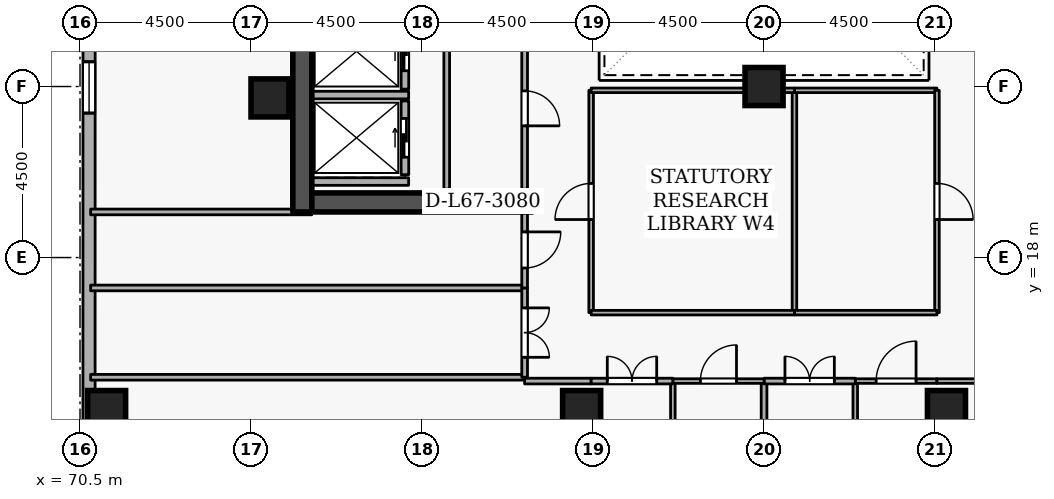
"""IFC4 building model, lengths in metres.
Left out: names, types, materials, properties, quantities, classifications, styles, units other than length and angle.
Written with IfcOpenShell. Run it as: python <this file> out.ifc"""

import sys

from ifc_helpers import new_model, si_unit, direction, frame, frame_2d, origin, origin_2d, place, context, subcontext, project, spatial, rectangle, extrude, element, fill, save


model = new_model("IFC4")
c1 = context("Model", 3, precision=1e-05, world=origin(), true_north=direction((0.0, 1.0)))
c2 = subcontext(c1, "Body", "Model", "MODEL_VIEW")
j1 = project(units=[si_unit("LENGTHUNIT", "METRE"), si_unit("PLANEANGLEUNIT", "RADIAN")], contexts=[c1])
p1 = place(None, origin())
s1 = spatial("IfcSite", under=j1, at=p1, CompositionType="ELEMENT")
p2 = place(p1, origin())
s2 = spatial("IfcBuilding", under=s1, at=p2, CompositionType="ELEMENT")
p3 = place(p2, frame((0.0, 0.0, 251.1)))
s3 = spatial("IfcBuildingStorey", under=s2, at=p3, CompositionType="ELEMENT", Elevation=251.1)
p4 = place(p3, frame((76.35, 19.2, 0.0), z_axis=(0.0, 0.0, 1.0), x_axis=(0.0, 1.0, 0.0)))
e1 = element("IfcWall", 1, at=p4, inside=s3, PredefinedType="SHEAR", context=c2, shape_type="SweptSolid", body=[
    extrude(rectangle(XDim=15.6, YDim=0.5, at=frame_2d((7.8, 0.0))), origin(), (0.0, 0.0, 1.0), 3.6),
])
p5 = place(p3, frame((76.6, 19.45, 0.0), z_axis=(0.0, 0.0, 1.0), x_axis=(1.0, 0.0, 0.0)))
e2 = element("IfcWall", 2, at=p5, inside=s3, PredefinedType="SHEAR", context=c2, shape_type="SweptSolid", body=[
    extrude(rectangle(XDim=5.8, YDim=0.5, at=frame_2d((2.9, 0.0))), origin(), (0.0, 0.0, 1.0), 3.6),
])
for number, where, z_axis, x_axis in (
    (3, (71.2, 14.0, 0.0), (0.0, 0.0, 1.0), (1.0, 0.0, 0.0)),
    (4, (93.3, 14.0, 0.0), (0.0, 0.0, 1.0), (1.0, 0.0, 0.0)),
    (5, (83.7, 14.0, 0.0), (0.0, 0.0, 1.0), (1.0, 0.0, 0.0)),
    (6, (75.5, 22.2, 0.0), (0.0, 0.0, 1.0), (1.0, 0.0, 0.0)),
    (7, (88.5, 22.5, 0.0), (0.0, 0.0, 1.0), (1.0, 0.0, 0.0)),
):
    element("IfcColumn", number, at=place(p3, frame(where, z_axis=z_axis, x_axis=x_axis)), inside=s3, PredefinedType="COLUMN", context=c2, shape_type="SweptSolid", body=[
        extrude(rectangle(XDim=1.0, YDim=1.0, at=origin_2d()), origin(), (0.0, 0.0, 1.0), 3.6),
    ])
p6 = place(p3, frame((70.742, 40.251, 0.0), z_axis=(0.0, 0.0, 1.0), x_axis=(-0.000184351399, -0.999999983007, 0.0)))
e8 = element("IfcWall", 8, at=p6, inside=s3, PredefinedType="STANDARD", context=c2, shape_type="SweptSolid", body=[
    extrude(rectangle(XDim=34.432, YDim=0.32, at=frame_2d((17.216, 0.0))), origin(), (0.0, 0.0, 1.0), 2.22),
])
p7 = place(p6, frame((7.5, 0.0, 0.72)))
e9 = element("IfcOpeningElement", 9, at=p7, cuts=e8, PredefinedType="OPENING", context=c2, shape_type="SweptSolid", body=[
    extrude(rectangle(XDim=1.35, YDim=1.05, at=frame_2d((0.675, 0.525))), frame((0.0, 0.17, 0.0), z_axis=(0.0, -1.0, 0.0), x_axis=(1.0, 0.0, 0.0)), (0.0, 0.0, 1.0), 0.34),
])
p8 = place(p6, frame((17.1, 0.0, 0.72)))
e10 = element("IfcOpeningElement", 10, at=p8, cuts=e8, PredefinedType="OPENING", context=c2, shape_type="SweptSolid", body=[
    extrude(rectangle(XDim=1.35, YDim=1.05, at=frame_2d((0.675, 0.525))), frame((0.0, 0.17, 0.0), z_axis=(0.0, -1.0, 0.0), x_axis=(1.0, 0.0, 0.0)), (0.0, 0.0, 1.0), 0.34),
])
p9 = place(p3, frame((79.05, 22.43, 0.0), z_axis=(0.0, 0.0, 1.0), x_axis=(0.0, 1.0, 0.0)))
e11 = element("IfcWall", 11, at=p9, inside=s3, PredefinedType="STANDARD", context=c2, shape_type="SweptSolid", body=[
    extrude(rectangle(XDim=1.99, YDim=0.2, at=frame_2d((0.995, 0.0))), origin(), (0.0, 0.0, 1.0), 3.32),
])
p10 = place(p9, frame((0.485, 0.0, 0.0)))
e12 = element("IfcOpeningElement", 12, at=p10, cuts=e11, PredefinedType="OPENING", context=c2, shape_type="SweptSolid", body=[
    extrude(rectangle(XDim=1.02, YDim=2.06, at=frame_2d((0.51, 1.03))), frame((0.0, 0.11, 0.0), z_axis=(0.0, -1.0, 0.0), x_axis=(1.0, 0.0, 0.0)), (0.0, 0.0, 1.0), 0.22),
])
p11 = place(p3, frame((79.05, 20.18, 0.0), z_axis=(0.0, 0.0, 1.0), x_axis=(0.0, 1.0, 0.0)))
e13 = element("IfcWall", 13, at=p11, inside=s3, PredefinedType="STANDARD", context=c2, shape_type="SweptSolid", body=[
    extrude(rectangle(XDim=1.94, YDim=0.2, at=frame_2d((0.97, 0.0))), origin(), (0.0, 0.0, 1.0), 3.32),
])
p12 = place(p11, frame((0.46, 0.0, 0.0)))
e14 = element("IfcOpeningElement", 14, at=p12, cuts=e13, PredefinedType="OPENING", context=c2, shape_type="SweptSolid", body=[
    extrude(rectangle(XDim=1.02, YDim=2.06, at=frame_2d((0.51, 1.03))), frame((0.0, 0.11, 0.0), z_axis=(0.0, -1.0, 0.0), x_axis=(1.0, 0.0, 0.0)), (0.0, 0.0, 1.0), 0.22),
])
for number, where, z_axis, x_axis in (
    (15, (76.612, 22.275, 0.0), (0.0, 0.0, 1.0), (1.0, 0.0, 0.0)),
    (16, (76.612, 20.0, 0.0), (0.0, 0.0, 1.0), (1.0, 0.0, 0.0)),
):
    element("IfcWall", number, at=place(p3, frame(where, z_axis=z_axis, x_axis=x_axis)), inside=s3, PredefinedType="STANDARD", context=c2, shape_type="SweptSolid", body=[
        extrude(rectangle(XDim=2.536, YDim=0.2, at=frame_2d((1.268, 0.0))), origin(), (0.0, 0.0, 1.0), 3.32),
    ])
p13 = place(p3, frame((80.15, 19.8, 0.0), z_axis=(0.0, 0.0, 1.0), x_axis=(0.0, 1.0, 0.0)))
e17 = element("IfcWall", 17, at=p13, inside=s3, PredefinedType="PARTITIONING", context=c2, shape_type="SweptSolid", body=[
    extrude(rectangle(XDim=4.25, YDim=0.15, at=frame_2d((2.125, 0.0))), origin(), (0.0, 0.0, 1.0), 3.32),
])
p14 = place(p3, frame((82.2, 24.05, 0.0), z_axis=(0.0, 0.0, 1.0), x_axis=(0.0, -1.0, 0.0)))
e18 = element("IfcWall", 18, at=p14, inside=s3, PredefinedType="PARTITIONING", context=c2, shape_type="SweptSolid", body=[
    extrude(rectangle(XDim=4.25, YDim=0.15, at=frame_2d((2.125, 0.0))), origin(), (0.0, 0.0, 1.0), 3.32),
])
p15 = place(p14, frame((1.665, 0.0, 0.0)))
e19 = element("IfcOpeningElement", 19, at=p15, cuts=e18, PredefinedType="OPENING", context=c2, shape_type="SweptSolid", body=[
    extrude(rectangle(XDim=0.92, YDim=2.08, at=frame_2d((0.46, 1.04))), frame((0.0, 0.085, 0.0), z_axis=(0.0, -1.0, 0.0), x_axis=(1.0, 0.0, 0.0)), (0.0, 0.0, 1.0), 0.17),
])
for number, where, z_axis, x_axis in (
    (20, (82.2, 14.85, 0.0), (0.0, 0.0, 1.0), (-1.0, 0.0, 0.0)),
    (21, (70.78, 17.2, 0.0), (0.0, 0.0, 1.0), (1.0, 0.0, 0.0)),
):
    element("IfcWall", number, at=place(p3, frame(where, z_axis=z_axis, x_axis=x_axis)), inside=s3, PredefinedType="PARTITIONING", context=c2, shape_type="SweptSolid", body=[
        extrude(rectangle(XDim=11.42, YDim=0.15, at=frame_2d((5.71, 0.0))), origin(), (0.0, 0.0, 1.0), 3.32),
    ])
p16 = place(p3, frame((82.2, 17.2, 0.0), z_axis=(0.0, 0.0, 1.0), x_axis=(0.0, -1.0, 0.0)))
e22 = element("IfcWall", 22, at=p16, inside=s3, PredefinedType="PARTITIONING", context=c2, shape_type="SweptSolid", body=[
    extrude(rectangle(XDim=2.35, YDim=0.15, at=frame_2d((1.175, 0.0))), origin(), (0.0, 0.0, 1.0), 3.32),
])
p17 = place(p16, frame((0.525, 0.0, 0.0)))
e23 = element("IfcOpeningElement", 23, at=p17, cuts=e22, PredefinedType="OPENING", context=c2, shape_type="SweptSolid", body=[
    extrude(rectangle(XDim=1.3, YDim=2.12, at=frame_2d((0.65, 1.06))), frame((0.0, 0.085, 0.0), z_axis=(0.0, -1.0, 0.0), x_axis=(1.0, 0.0, 0.0)), (0.0, 0.0, 1.0), 0.17),
])
p18 = place(p3, frame((70.78, 19.2, 0.0), z_axis=(0.0, 0.0, 1.0), x_axis=(1.0, 0.0, 0.0)))
e24 = element("IfcWall", 24, at=p18, inside=s3, PredefinedType="PARTITIONING", context=c2, shape_type="SweptSolid", body=[
    extrude(rectangle(XDim=5.82, YDim=0.15, at=frame_2d((2.91, 0.0))), origin(), (0.0, 0.0, 1.0), 2.525),
])
p19 = place(p3, frame((82.2, 19.2, 0.0), z_axis=(0.0, 0.0, 1.0), x_axis=(0.0, -1.0, 0.0)))
e25 = element("IfcWall", 25, at=p19, inside=s3, PredefinedType="PARTITIONING", context=c2, shape_type="SweptSolid", body=[
    extrude(rectangle(XDim=2.0, YDim=0.15, at=frame_2d((1.0, 0.0))), origin(), (0.0, 0.0, 1.0), 3.32),
])
p20 = place(p19, frame((0.525, 0.0, 0.0)))
e26 = element("IfcOpeningElement", 26, at=p20, cuts=e25, PredefinedType="OPENING", context=c2, shape_type="SweptSolid", body=[
    extrude(rectangle(XDim=0.95, YDim=2.1, at=frame_2d((0.475, 1.05))), frame((0.0, 0.085, 0.0), z_axis=(0.0, -1.0, 0.0), x_axis=(1.0, 0.0, 0.0)), (0.0, 0.0, 1.0), 0.17),
])
p21 = place(p3, frame((90.9, 3.28, 0.0), z_axis=(0.0, 0.0, 1.0), x_axis=(0.0, 1.0, 0.0)))
e27 = element("IfcWall", 27, at=p21, inside=s3, PredefinedType="PARTITIONING", context=c2, shape_type="SweptSolid", body=[
    extrude(rectangle(XDim=11.47, YDim=0.12, at=frame_2d((5.735, 0.0))), origin(), (0.0, 0.0, 1.0), 3.32),
])
p22 = place(p3, frame((90.9, 14.75, 0.0), z_axis=(0.0, 0.0, 1.0), x_axis=(1.0, 0.0, 0.0)))
e28 = element("IfcWall", 28, at=p22, inside=s3, PredefinedType="PARTITIONING", context=c2, shape_type="SweptSolid", body=[
    extrude(rectangle(XDim=2.15, YDim=0.12, at=frame_2d((1.075, 0.0))), origin(), (0.0, 0.0, 1.0), 3.32),
])
p23 = place(p22, frame((0.55, 0.0, 0.0)))
e29 = element("IfcOpeningElement", 29, at=p23, cuts=e28, PredefinedType="OPENING", context=c2, shape_type="SweptSolid", body=[
    extrude(rectangle(XDim=1.05, YDim=2.1, at=frame_2d((0.525, 1.05))), frame((0.0, 0.07, 0.0), z_axis=(0.0, -1.0, 0.0), x_axis=(1.0, 0.0, 0.0)), (0.0, 0.0, 1.0), 0.14),
])
p24 = place(p3, frame((93.05, 14.75, 0.0), z_axis=(0.0, 0.0, 1.0), x_axis=(1.0, 0.0, 0.0)))
e30 = element("IfcWall", 30, at=p24, inside=s3, PredefinedType="PARTITIONING", context=c2, shape_type="SweptSolid", body=[
    extrude(rectangle(XDim=1.75, YDim=0.12, at=frame_2d((0.875, 0.0))), origin(), (0.0, 0.0, 1.0), 3.32),
])
p25 = place(p3, frame((88.5, 3.28, 0.0), z_axis=(0.0, 0.0, 1.0), x_axis=(0.0, 1.0, 0.0)))
e31 = element("IfcWall", 31, at=p25, inside=s3, PredefinedType="PARTITIONING", context=c2, shape_type="SweptSolid", body=[
    extrude(rectangle(XDim=11.47, YDim=0.15, at=frame_2d((5.735, 0.0))), origin(), (0.0, 0.0, 1.0), 2.862),
])
p26 = place(p3, frame((88.5, 14.75, 0.0), z_axis=(0.0, 0.0, 1.0), x_axis=(1.0, 0.0, 0.0)))
e32 = element("IfcWall", 32, at=p26, inside=s3, PredefinedType="PARTITIONING", context=c2, shape_type="SweptSolid", body=[
    extrude(rectangle(XDim=2.4, YDim=0.15, at=frame_2d((1.2, 0.0))), origin(), (0.0, 0.0, 1.0), 3.32),
])
p27 = place(p26, frame((0.55, 0.0, 0.0)))
e33 = element("IfcOpeningElement", 33, at=p27, cuts=e32, PredefinedType="OPENING", context=c2, shape_type="SweptSolid", body=[
    extrude(rectangle(XDim=1.3, YDim=2.12, at=frame_2d((0.65, 1.06))), frame((0.0, 0.085, 0.0), z_axis=(0.0, -1.0, 0.0), x_axis=(1.0, 0.0, 0.0)), (0.0, 0.0, 1.0), 0.17),
])
p28 = place(p3, frame((86.1, 3.28, 0.0), z_axis=(0.0, 0.0, 1.0), x_axis=(0.0, 1.0, 0.0)))
e34 = element("IfcWall", 34, at=p28, inside=s3, PredefinedType="PARTITIONING", context=c2, shape_type="SweptSolid", body=[
    extrude(rectangle(XDim=11.47, YDim=0.12, at=frame_2d((5.735, 0.0))), origin(), (0.0, 0.0, 1.0), 3.32),
])
p29 = place(p3, frame((86.1, 14.75, 0.0), z_axis=(0.0, 0.0, 1.0), x_axis=(1.0, 0.0, 0.0)))
e35 = element("IfcWall", 35, at=p29, inside=s3, PredefinedType="PARTITIONING", context=c2, shape_type="SweptSolid", body=[
    extrude(rectangle(XDim=2.4, YDim=0.12, at=frame_2d((1.2, 0.0))), origin(), (0.0, 0.0, 1.0), 3.32),
])
p30 = place(p29, frame((0.725, 0.0, 0.0)))
e36 = element("IfcOpeningElement", 36, at=p30, cuts=e35, PredefinedType="OPENING", context=c2, shape_type="SweptSolid", body=[
    extrude(rectangle(XDim=0.95, YDim=2.1, at=frame_2d((0.475, 1.05))), frame((0.0, 0.07, 0.0), z_axis=(0.0, -1.0, 0.0), x_axis=(1.0, 0.0, 0.0)), (0.0, 0.0, 1.0), 0.14),
])
p31 = place(p3, frame((82.2, 14.75, 0.0), z_axis=(0.0, 0.0, 1.0), x_axis=(1.0, 0.0, 0.0)))
e37 = element("IfcWall", 37, at=p31, inside=s3, PredefinedType="PARTITIONING", context=c2, shape_type="SweptSolid", body=[
    extrude(rectangle(XDim=1.75, YDim=0.15, at=frame_2d((0.875, 0.0))), origin(), (0.0, 0.0, 1.0), 3.32),
])
p32 = place(p3, frame((83.95, 14.75, 0.0), z_axis=(0.0, 0.0, 1.0), x_axis=(1.0, 0.0, 0.0)))
e38 = element("IfcWall", 38, at=p32, inside=s3, PredefinedType="PARTITIONING", context=c2, shape_type="SweptSolid", body=[
    extrude(rectangle(XDim=2.15, YDim=0.15, at=frame_2d((1.075, 0.0))), origin(), (0.0, 0.0, 1.0), 3.32),
])
p33 = place(p32, frame((0.425, 0.0, 0.0)))
e39 = element("IfcOpeningElement", 39, at=p33, cuts=e38, PredefinedType="OPENING", context=c2, shape_type="SweptSolid", body=[
    extrude(rectangle(XDim=1.3, YDim=2.12, at=frame_2d((0.65, 1.06))), frame((0.0, 0.085, 0.0), z_axis=(0.0, -1.0, 0.0), x_axis=(1.0, 0.0, 0.0)), (0.0, 0.0, 1.0), 0.17),
])
p34 = place(p3, frame((89.3, 16.55, 0.0), z_axis=(0.0, 0.0, 1.0), x_axis=(0.0, 1.0, 0.0)))
e40 = element("IfcWall", 40, at=p34, inside=s3, PredefinedType="PARTITIONING", context=c2, shape_type="SweptSolid", body=[
    extrude(rectangle(XDim=5.85, YDim=0.12, at=frame_2d((2.925, 0.0))), origin(), (0.0, 0.0, 1.0), 3.32),
])
p35 = place(p3, frame((89.3, 22.4, 0.0), z_axis=(0.0, 0.0, 1.0), x_axis=(1.0, 0.0, 0.0)))
e41 = element("IfcWall", 41, at=p35, inside=s3, PredefinedType="PARTITIONING", context=c2, shape_type="SweptSolid", body=[
    extrude(rectangle(XDim=3.75, YDim=0.12, at=frame_2d((1.875, 0.0))), origin(), (0.0, 0.0, 1.0), 3.32),
])
p36 = place(p3, frame((93.05, 22.4, 0.0), z_axis=(0.0, 0.0, 1.0), x_axis=(0.0, -1.0, 0.0)))
e42 = element("IfcWall", 42, at=p36, inside=s3, PredefinedType="PARTITIONING", context=c2, shape_type="SweptSolid", body=[
    extrude(rectangle(XDim=5.85, YDim=0.12, at=frame_2d((2.925, 0.0))), origin(), (0.0, 0.0, 1.0), 3.32),
])
p37 = place(p36, frame((2.45, 0.0, 0.0)))
e43 = element("IfcOpeningElement", 43, at=p37, cuts=e42, PredefinedType="OPENING", context=c2, shape_type="SweptSolid", body=[
    extrude(rectangle(XDim=0.95, YDim=2.1, at=frame_2d((0.475, 1.05))), frame((0.0, 0.07, 0.0), z_axis=(0.0, -1.0, 0.0), x_axis=(1.0, 0.0, 0.0)), (0.0, 0.0, 1.0), 0.14),
])
p38 = place(p3, frame((93.05, 16.55, 0.0), z_axis=(0.0, 0.0, 1.0), x_axis=(-1.0, 0.0, 0.0)))
e44 = element("IfcWall", 44, at=p38, inside=s3, PredefinedType="PARTITIONING", context=c2, shape_type="SweptSolid", body=[
    extrude(rectangle(XDim=3.75, YDim=0.12, at=frame_2d((1.875, 0.0))), origin(), (0.0, 0.0, 1.0), 3.32),
])
p39 = place(p3, frame((83.95, 16.55, 0.0), z_axis=(0.0, 0.0, 1.0), x_axis=(0.0, 1.0, 0.0)))
e45 = element("IfcWall", 45, at=p39, inside=s3, PredefinedType="PARTITIONING", context=c2, shape_type="SweptSolid", body=[
    extrude(rectangle(XDim=5.85, YDim=0.12, at=frame_2d((2.925, 0.0))), origin(), (0.0, 0.0, 1.0), 3.32),
])
p40 = place(p39, frame((2.45, 0.0, 0.0)))
e46 = element("IfcOpeningElement", 46, at=p40, cuts=e45, PredefinedType="OPENING", context=c2, shape_type="SweptSolid", body=[
    extrude(rectangle(XDim=0.95, YDim=2.1, at=frame_2d((0.475, 1.05))), frame((0.0, 0.07, 0.0), z_axis=(0.0, -1.0, 0.0), x_axis=(1.0, 0.0, 0.0)), (0.0, 0.0, 1.0), 0.14),
])
for number, where, z_axis, x_axis in (
    (47, (83.95, 22.4, 0.0), (0.0, 0.0, 1.0), (1.0, 0.0, 0.0)),
    (48, (89.3, 16.55, 0.0), (0.0, 0.0, 1.0), (-1.0, 0.0, 0.0)),
):
    element("IfcWall", number, at=place(p3, frame(where, z_axis=z_axis, x_axis=x_axis)), inside=s3, PredefinedType="PARTITIONING", context=c2, shape_type="SweptSolid", body=[
        extrude(rectangle(XDim=5.35, YDim=0.12, at=frame_2d((2.675, 0.0))), origin(), (0.0, 0.0, 1.0), 3.32),
    ])
p41 = place(p8, origin())
e49 = element("IfcWindow", 49, at=p41, inside=s3, PartitioningType="SINGLE_PANEL", PredefinedType="WINDOW", context=c2, shape_type="SweptSolid", body=[
    extrude(rectangle(XDim=1.35, YDim=1.05, at=frame_2d((0.675, 0.525))), frame((0.0, 0.03, 0.0), z_axis=(0.0, -1.0, 0.0), x_axis=(1.0, 0.0, 0.0)), (0.0, 0.0, 1.0), 0.06),
])
fill(e10, e49)
p42 = place(p10, origin())
e50 = element("IfcDoor", 50, at=p42, inside=s3, OperationType="SLIDING_TO_LEFT", PredefinedType="DOOR", context=c2, shape_type="SweptSolid", body=[
    extrude(rectangle(XDim=1.02, YDim=2.06, at=frame_2d((0.51, 1.03))), frame((0.0, 0.025, 0.0), z_axis=(0.0, -1.0, 0.0), x_axis=(1.0, 0.0, 0.0)), (0.0, 0.0, 1.0), 0.05),
])
fill(e12, e50)
p43 = place(p12, origin())
e51 = element("IfcDoor", 51, at=p43, inside=s3, OperationType="SLIDING_TO_LEFT", PredefinedType="DOOR", context=c2, shape_type="SweptSolid", body=[
    extrude(rectangle(XDim=1.02, YDim=2.06, at=frame_2d((0.51, 1.03))), frame((0.0, 0.025, 0.0), z_axis=(0.0, -1.0, 0.0), x_axis=(1.0, 0.0, 0.0)), (0.0, 0.0, 1.0), 0.05),
])
fill(e14, e51)
p44 = place(p15, origin())
e52 = element("IfcDoor", 52, at=p44, inside=s3, OperationType="SINGLE_SWING_RIGHT", PredefinedType="DOOR", context=c2, shape_type="SweptSolid", body=[
    extrude(rectangle(XDim=0.92, YDim=2.08, at=frame_2d((0.46, 1.04))), frame((0.0, 0.025, 0.0), z_axis=(0.0, -1.0, 0.0), x_axis=(1.0, 0.0, 0.0)), (0.0, 0.0, 1.0), 0.05),
])
fill(e19, e52)
p45 = place(p17, origin())
e53 = element("IfcDoor", 53, at=p45, inside=s3, OperationType="DOUBLE_DOOR_SINGLE_SWING", PredefinedType="DOOR", context=c2, shape_type="SweptSolid", body=[
    extrude(rectangle(XDim=1.3, YDim=2.12, at=frame_2d((0.65, 1.06))), frame((0.0, 0.025, 0.0), z_axis=(0.0, -1.0, 0.0), x_axis=(1.0, 0.0, 0.0)), (0.0, 0.0, 1.0), 0.05),
])
fill(e23, e53)
p46 = place(p20, origin())
e54 = element("IfcDoor", 54, at=p46, inside=s3, OperationType="SINGLE_SWING_LEFT", PredefinedType="DOOR", context=c2, shape_type="SweptSolid", body=[
    extrude(rectangle(XDim=0.95, YDim=2.1, at=frame_2d((0.475, 1.05))), frame((0.0, 0.025, 0.0), z_axis=(0.0, -1.0, 0.0), x_axis=(1.0, 0.0, 0.0)), (0.0, 0.0, 1.0), 0.05),
])
fill(e26, e54)
p47 = place(p23, origin())
e55 = element("IfcDoor", 55, at=p47, inside=s3, OperationType="SINGLE_SWING_RIGHT", PredefinedType="DOOR", context=c2, shape_type="SweptSolid", body=[
    extrude(rectangle(XDim=1.05, YDim=2.1, at=frame_2d((0.525, 1.05))), frame((0.0, 0.025, 0.0), z_axis=(0.0, -1.0, 0.0), x_axis=(1.0, 0.0, 0.0)), (0.0, 0.0, 1.0), 0.05),
])
fill(e29, e55)
p48 = place(p27, origin())
e56 = element("IfcDoor", 56, at=p48, inside=s3, OperationType="DOUBLE_DOOR_SINGLE_SWING", PredefinedType="DOOR", context=c2, shape_type="SweptSolid", body=[
    extrude(rectangle(XDim=1.3, YDim=2.12, at=frame_2d((0.65, 1.06))), frame((0.0, 0.025, 0.0), z_axis=(0.0, -1.0, 0.0), x_axis=(1.0, 0.0, 0.0)), (0.0, 0.0, 1.0), 0.05),
])
fill(e33, e56)
p49 = place(p30, origin())
e57 = element("IfcDoor", 57, at=p49, inside=s3, OperationType="SINGLE_SWING_RIGHT", PredefinedType="DOOR", context=c2, shape_type="SweptSolid", body=[
    extrude(rectangle(XDim=0.95, YDim=2.1, at=frame_2d((0.475, 1.05))), frame((0.0, 0.025, 0.0), z_axis=(0.0, -1.0, 0.0), x_axis=(1.0, 0.0, 0.0)), (0.0, 0.0, 1.0), 0.05),
])
fill(e36, e57)
p50 = place(p33, origin())
e58 = element("IfcDoor", 58, at=p50, inside=s3, OperationType="DOUBLE_DOOR_SINGLE_SWING", PredefinedType="DOOR", context=c2, shape_type="SweptSolid", body=[
    extrude(rectangle(XDim=1.3, YDim=2.12, at=frame_2d((0.65, 1.06))), frame((0.0, 0.025, 0.0), z_axis=(0.0, -1.0, 0.0), x_axis=(1.0, 0.0, 0.0)), (0.0, 0.0, 1.0), 0.05),
])
fill(e39, e58)
p51 = place(p37, origin())
e59 = element("IfcDoor", 59, at=p51, inside=s3, OperationType="SINGLE_SWING_RIGHT", PredefinedType="DOOR", context=c2, shape_type="SweptSolid", body=[
    extrude(rectangle(XDim=0.95, YDim=2.1, at=frame_2d((0.475, 1.05))), frame((0.0, 0.025, 0.0), z_axis=(0.0, -1.0, 0.0), x_axis=(1.0, 0.0, 0.0)), (0.0, 0.0, 1.0), 0.05),
])
fill(e43, e59)
p52 = place(p40, origin())
e60 = element("IfcDoor", 60, at=p52, inside=s3, OperationType="SINGLE_SWING_LEFT", PredefinedType="DOOR", context=c2, shape_type="SweptSolid", body=[
    extrude(rectangle(XDim=0.95, YDim=2.1, at=frame_2d((0.475, 1.05))), frame((0.0, 0.025, 0.0), z_axis=(0.0, -1.0, 0.0), x_axis=(1.0, 0.0, 0.0)), (0.0, 0.0, 1.0), 0.05),
])
fill(e46, e60)
save(model, sys.argv[1])
